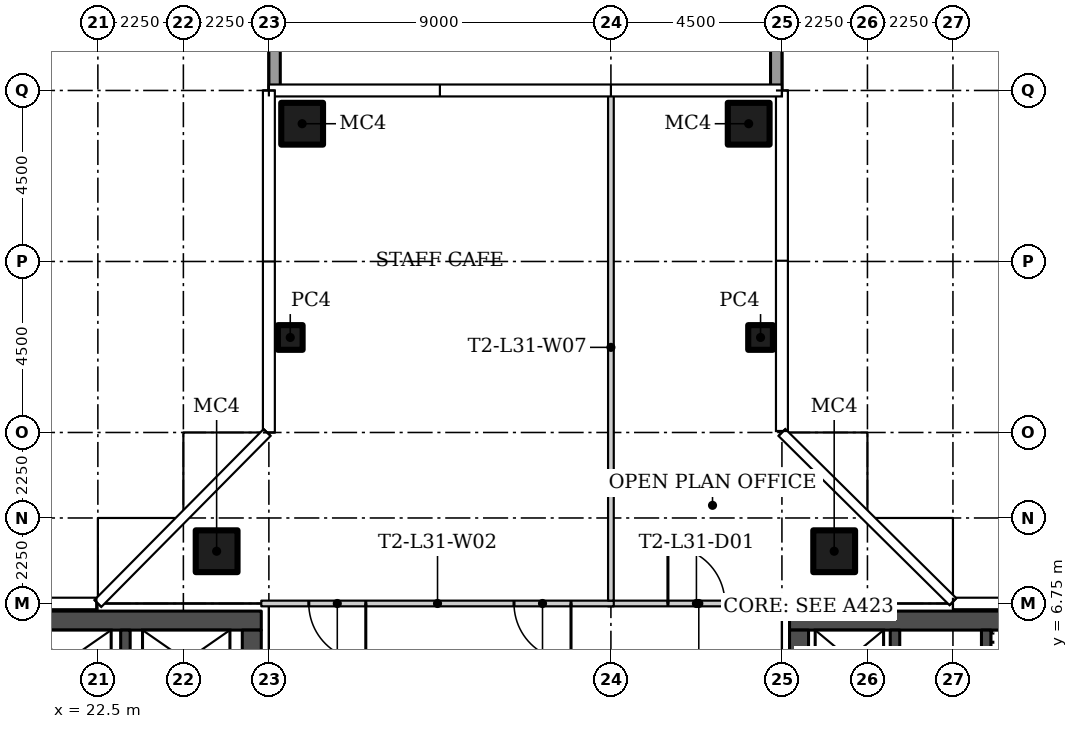
"""IFC4 building model, lengths in metres.
Left out: names, types, materials, properties, quantities, classifications, styles, units other than length and angle.
Written with IfcOpenShell. Run it as: python <this file> out.ifc"""

import sys

from ifc_helpers import new_model, si_unit, direction, frame, frame_2d, origin, origin_2d, place, context, subcontext, project, spatial, rectangle, hollow_rectangle, extrude, element, fill, save


model = new_model("IFC4")
c1 = context("Model", 3, precision=1e-05, world=origin(), true_north=direction((0.0, 1.0)))
c2 = subcontext(c1, "Body", "Model", "MODEL_VIEW")
j1 = project(units=[si_unit("LENGTHUNIT", "METRE"), si_unit("PLANEANGLEUNIT", "RADIAN")], contexts=[c1])
p1 = place(None, origin())
s1 = spatial("IfcSite", under=j1, at=p1, CompositionType="ELEMENT")
p2 = place(p1, origin())
s2 = spatial("IfcBuilding", under=s1, at=p2, CompositionType="ELEMENT")
p3 = place(p2, frame((0.0, 0.0, 133.5)))
s3 = spatial("IfcBuildingStorey", under=s2, at=p3, CompositionType="ELEMENT", Elevation=133.5)
for number, where in (
    (1, (25.625, 8.125, 0.0)),
    (2, (41.875, 8.125, 0.0)),
):
    element("IfcColumn", number, at=place(p3, frame(where)), inside=s3, PredefinedType="COLUMN", context=c2, shape_type="SweptSolid", body=[
        extrude(hollow_rectangle(XDim=1.1, YDim=1.1, WallThickness=0.04, at=origin_2d()), origin(), (0.0, 0.0, 1.0), 5.05),
    ])
p4 = place(p3, frame((39.938, 13.75, 0.0)))
e3 = element("IfcColumn", 3, at=p4, inside=s3, PredefinedType="COLUMN", context=c2, shape_type="SweptSolid", body=[
    extrude(hollow_rectangle(XDim=0.65, YDim=0.65, WallThickness=0.02, at=origin_2d()), origin(), (0.0, 0.0, 1.0), 5.05),
])
p5 = place(p3, frame((39.625, 19.375, 0.0)))
e4 = element("IfcColumn", 4, at=p5, inside=s3, PredefinedType="COLUMN", context=c2, shape_type="SweptSolid", body=[
    extrude(hollow_rectangle(XDim=1.1, YDim=1.1, WallThickness=0.04, at=origin_2d()), origin(), (0.0, 0.0, 1.0), 5.05),
])
p6 = place(p3, frame((27.562, 13.75, 0.0)))
e5 = element("IfcColumn", 5, at=p6, inside=s3, PredefinedType="COLUMN", context=c2, shape_type="SweptSolid", body=[
    extrude(hollow_rectangle(XDim=0.65, YDim=0.65, WallThickness=0.02, at=origin_2d()), origin(), (0.0, 0.0, 1.0), 5.05),
])
p7 = place(p3, frame((27.875, 19.375, 0.0)))
e6 = element("IfcColumn", 6, at=p7, inside=s3, PredefinedType="COLUMN", context=c2, shape_type="SweptSolid", body=[
    extrude(hollow_rectangle(XDim=1.1, YDim=1.1, WallThickness=0.04, at=origin_2d()), origin(), (0.0, 0.0, 1.0), 5.05),
])
p8 = place(p3, frame((35.925, 6.75, 0.0)))
e7 = element("IfcWall", 7, at=p8, inside=s3, PredefinedType="PARTITIONING", context=c2, shape_type="SweptSolid", body=[
    extrude(rectangle(XDim=4.775, YDim=0.15, at=frame_2d((2.387, 0.0))), origin(), (0.0, 0.0, 1.0), 5.05),
])
p9 = place(p8, frame((1.575, 0.0, 0.0)))
e8 = element("IfcOpeningElement", 8, at=p9, cuts=e7, PredefinedType="OPENING", context=c2, shape_type="SweptSolid", body=[
    extrude(rectangle(XDim=1.5, YDim=2.1, at=frame_2d((0.75, 1.05))), frame((0.0, 0.085, 0.0), z_axis=(0.0, -1.0, 0.0), x_axis=(1.0, 0.0, 0.0)), (0.0, 0.0, 1.0), 0.17),
])
p10 = place(p3, frame((36.075, 6.75, 0.0), z_axis=(0.0, 0.0, 1.0), x_axis=(-1.0, 0.0, 0.0)))
e9 = element("IfcWall", 9, at=p10, inside=s3, PredefinedType="PARTITIONING", context=c2, shape_type="SweptSolid", body=[
    extrude(rectangle(XDim=9.275, YDim=0.15, at=frame_2d((4.637, 0.0))), origin(), (0.0, 0.0, 1.0), 5.05),
])
p11 = place(p10, frame((6.525, 0.0, 0.0)))
e10 = element("IfcOpeningElement", 10, at=p11, cuts=e9, PredefinedType="OPENING", context=c2, shape_type="SweptSolid", body=[
    extrude(rectangle(XDim=1.5, YDim=2.1, at=frame_2d((0.75, 1.05))), frame((0.0, 0.085, 0.0), z_axis=(0.0, -1.0, 0.0), x_axis=(1.0, 0.0, 0.0)), (0.0, 0.0, 1.0), 0.17),
])
p12 = place(p10, frame((1.125, 0.0, 0.0)))
e11 = element("IfcOpeningElement", 11, at=p12, cuts=e9, PredefinedType="OPENING", context=c2, shape_type="SweptSolid", body=[
    extrude(rectangle(XDim=1.5, YDim=2.1, at=frame_2d((0.75, 1.05))), frame((0.0, 0.085, 0.0), z_axis=(0.0, -1.0, 0.0), x_axis=(1.0, 0.0, 0.0)), (0.0, 0.0, 1.0), 0.17),
])
p13 = place(p3, frame((36.0, 20.155, 0.0), z_axis=(0.0, 0.0, 1.0), x_axis=(0.0, -1.0, 0.0)))
e12 = element("IfcWall", 12, at=p13, inside=s3, PredefinedType="PARTITIONING", context=c2, shape_type="SweptSolid", body=[
    extrude(rectangle(XDim=13.33, YDim=0.15, at=frame_2d((6.665, 0.0))), origin(), (0.0, 0.0, 1.0), 5.05),
])
p14 = place(p3, frame((40.35, 20.25, 0.0), z_axis=(0.0, 0.0, 1.0), x_axis=(0.0, 1.0, 0.0)))
e13 = element("IfcWall", 13, at=p14, inside=s3, PredefinedType="PARAPET", context=c2, shape_type="SweptSolid", body=[
    extrude(rectangle(XDim=4.5, YDim=0.3, at=frame_2d((2.25, 0.0))), origin(), (0.0, 0.0, 1.0), 1.1),
])
p15 = place(p3, frame((27.15, 24.45, 0.0), z_axis=(0.0, 0.0, 1.0), x_axis=(0.0, -1.0, 0.0)))
e14 = element("IfcWall", 14, at=p15, inside=s3, PredefinedType="PARAPET", context=c2, shape_type="SweptSolid", body=[
    extrude(rectangle(XDim=4.2, YDim=0.3, at=frame_2d((2.1, 0.0))), origin(), (0.0, 0.0, 1.0), 1.1),
])
p16 = place(p3, frame((13.7, 6.3, 0.0)))
e15 = element("IfcWall", 15, at=p16, inside=s3, PredefinedType="SHEAR", context=c2, shape_type="SweptSolid", body=[
    extrude(rectangle(XDim=13.1, YDim=0.5, at=frame_2d((6.55, 0.0))), origin(), (0.0, 0.0, 1.0), 5.05),
])
p17 = place(p3, frame((26.55, 6.05, 0.0), z_axis=(0.0, 0.0, 1.0), x_axis=(0.0, -1.0, 0.0)))
e16 = element("IfcWall", 16, at=p17, inside=s3, PredefinedType="SHEAR", context=c2, shape_type="SweptSolid", body=[
    extrude(rectangle(XDim=12.1, YDim=0.5, at=frame_2d((6.05, 0.0))), origin(), (0.0, 0.0, 1.0), 5.05),
])
p18 = place(p17, frame((10.1, 0.0, 0.0)))
e17 = element("IfcOpeningElement", 17, at=p18, cuts=e16, PredefinedType="OPENING", context=c2, shape_type="SweptSolid", body=[
    extrude(rectangle(XDim=1.2, YDim=2.1, at=frame_2d((0.6, 1.05))), frame((0.0, 0.26, 0.0), z_axis=(0.0, -1.0, 0.0), x_axis=(1.0, 0.0, 0.0)), (0.0, 0.0, 1.0), 0.52),
])
p19 = place(p17, frame((3.9, 0.0, 0.0)))
e18 = element("IfcOpeningElement", 18, at=p19, cuts=e16, PredefinedType="OPENING", context=c2, shape_type="SweptSolid", body=[
    extrude(rectangle(XDim=1.8, YDim=2.4, at=frame_2d((0.9, 1.2))), frame((0.0, 0.26, 0.0), z_axis=(0.0, -1.0, 0.0), x_axis=(1.0, 0.0, 0.0)), (0.0, 0.0, 1.0), 0.52),
])
p20 = place(p3, frame((23.225, 3.25, 0.0), z_axis=(0.0, 0.0, 1.0), x_axis=(0.0, 1.0, 0.0)))
e19 = element("IfcWall", 19, at=p20, inside=s3, PredefinedType="SHEAR", context=c2, shape_type="SweptSolid", body=[
    extrude(rectangle(XDim=2.8, YDim=0.25, at=frame_2d((1.4, 0.0))), origin(), (0.0, 0.0, 1.0), 5.05),
])
p21 = place(p3, frame((53.8, 6.3, 0.0), z_axis=(0.0, 0.0, 1.0), x_axis=(-1.0, 0.0, 0.0)))
e20 = element("IfcWall", 20, at=p21, inside=s3, PredefinedType="SHEAR", context=c2, shape_type="SweptSolid", body=[
    extrude(rectangle(XDim=13.1, YDim=0.5, at=frame_2d((6.55, 0.0))), origin(), (0.0, 0.0, 1.0), 5.05),
])
p22 = place(p3, frame((40.95, -6.05, 0.0), z_axis=(0.0, 0.0, 1.0), x_axis=(0.0, 1.0, 0.0)))
e21 = element("IfcWall", 21, at=p22, inside=s3, PredefinedType="SHEAR", context=c2, shape_type="SweptSolid", body=[
    extrude(rectangle(XDim=12.1, YDim=0.5, at=frame_2d((6.05, 0.0))), origin(), (0.0, 0.0, 1.0), 5.05),
])
p23 = place(p22, frame((0.8, 0.0, 0.0)))
e22 = element("IfcOpeningElement", 22, at=p23, cuts=e21, PredefinedType="OPENING", context=c2, shape_type="SweptSolid", body=[
    extrude(rectangle(XDim=1.2, YDim=2.1, at=frame_2d((0.6, 1.05))), frame((0.0, 0.26, 0.0), z_axis=(0.0, -1.0, 0.0), x_axis=(1.0, 0.0, 0.0)), (0.0, 0.0, 1.0), 0.52),
])
p24 = place(p22, frame((6.4, 0.0, 0.0)))
e23 = element("IfcOpeningElement", 23, at=p24, cuts=e21, PredefinedType="OPENING", context=c2, shape_type="SweptSolid", body=[
    extrude(rectangle(XDim=1.8, YDim=2.4, at=frame_2d((0.9, 1.2))), frame((0.0, 0.26, 0.0), z_axis=(0.0, -1.0, 0.0), x_axis=(1.0, 0.0, 0.0)), (0.0, 0.0, 1.0), 0.52),
])
for number, where, z_axis, x_axis in (
    (24, (45.875, 3.25, 0.0), (0.0, 0.0, 1.0), (0.0, 1.0, 0.0)),
    (25, (43.475, 3.25, 0.0), (0.0, 0.0, 1.0), (0.0, 1.0, 0.0)),
):
    element("IfcWall", number, at=place(p3, frame(where, z_axis=z_axis, x_axis=x_axis)), inside=s3, PredefinedType="SHEAR", context=c2, shape_type="SweptSolid", body=[
        extrude(rectangle(XDim=2.8, YDim=0.25, at=frame_2d((1.4, 0.0))), origin(), (0.0, 0.0, 1.0), 5.05),
    ])
p25 = place(p9, origin())
e26 = element("IfcDoor", 26, at=p25, inside=s3, OperationType="DOUBLE_DOOR_SINGLE_SWING", PredefinedType="DOOR", context=c2, shape_type="SweptSolid", body=[
    extrude(rectangle(XDim=1.5, YDim=2.1, at=frame_2d((0.75, 1.05))), frame((0.0, 0.025, 0.0), z_axis=(0.0, -1.0, 0.0), x_axis=(1.0, 0.0, 0.0)), (0.0, 0.0, 1.0), 0.05),
])
fill(e8, e26)
p26 = place(p11, origin())
e27 = element("IfcDoor", 27, at=p26, inside=s3, OperationType="DOUBLE_DOOR_SINGLE_SWING", PredefinedType="DOOR", context=c2, shape_type="SweptSolid", body=[
    extrude(rectangle(XDim=1.5, YDim=2.1, at=frame_2d((0.75, 1.05))), frame((0.0, 0.025, 0.0), z_axis=(0.0, -1.0, 0.0), x_axis=(1.0, 0.0, 0.0)), (0.0, 0.0, 1.0), 0.05),
])
fill(e10, e27)
p27 = place(p12, origin())
e28 = element("IfcDoor", 28, at=p27, inside=s3, OperationType="DOUBLE_DOOR_SINGLE_SWING", PredefinedType="DOOR", context=c2, shape_type="SweptSolid", body=[
    extrude(rectangle(XDim=1.5, YDim=2.1, at=frame_2d((0.75, 1.05))), frame((0.0, 0.025, 0.0), z_axis=(0.0, -1.0, 0.0), x_axis=(1.0, 0.0, 0.0)), (0.0, 0.0, 1.0), 0.05),
])
fill(e11, e28)
save(model, sys.argv[1])
